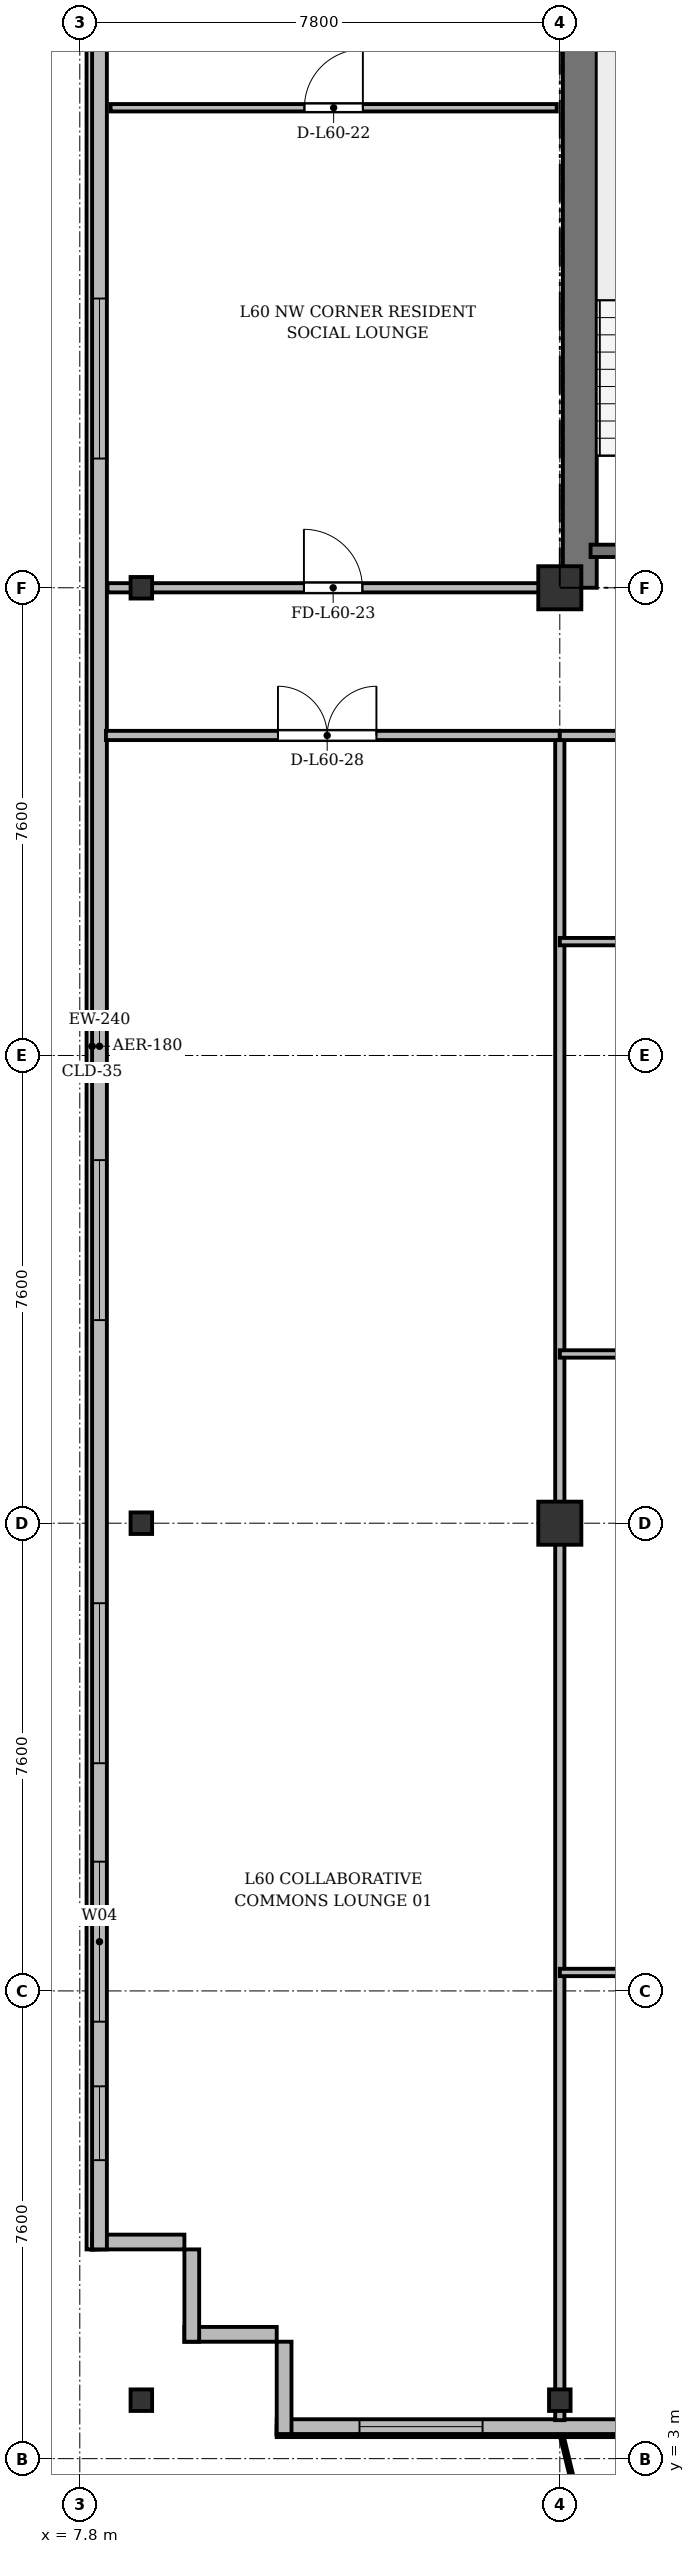
"""IFC4 building model, lengths in metres.
Left out: names, types, materials, properties, quantities, classifications, styles, units other than length and angle.
Written with IfcOpenShell. Run it as: python <this file> out.ifc"""

import sys

from ifc_helpers import new_model, si_unit, direction, frame, frame_2d, origin, origin_2d, place, context, subcontext, project, spatial, rectangle, i_section, extrude, source, transform, mapped, element, fill, save


model = new_model("IFC4")
c1 = context("Model", 3, precision=1e-05, world=origin(), true_north=direction((0.0, 1.0)))
c2 = subcontext(c1, "Body", "Model", "MODEL_VIEW")
j1 = project(units=[si_unit("LENGTHUNIT", "METRE"), si_unit("PLANEANGLEUNIT", "RADIAN")], contexts=[c1])
p1 = place(None, origin())
s1 = spatial("IfcSite", under=j1, at=p1, CompositionType="ELEMENT")
p2 = place(p1, origin())
s2 = spatial("IfcBuilding", under=s1, at=p2, CompositionType="ELEMENT")
p3 = place(p2, frame((0.0, 0.0, 230.1)))
s3 = spatial("IfcBuildingStorey", under=s2, at=p3, CompositionType="ELEMENT", Elevation=230.1)
m1 = source(origin(), c2, "Body", "SweptSolid", [
    extrude(i_section(OverallWidth=0.35, OverallDepth=0.35, WebThickness=0.018, FlangeThickness=0.028, at=origin_2d()), origin(), (0.0, 0.0, 1.0), 3.6),
])
for number, where, z_axis, x_axis in (
    (1, (8.8, 3.95, 0.0), (0.0, 0.0, 1.0), (1.0, 0.0, 0.0)),
    (2, (8.8, 18.2, 0.0), (0.0, 0.0, 1.0), (1.0, 0.0, 0.0)),
    (3, (8.8, 33.4, 0.0), (0.0, 0.0, 1.0), (1.0, 0.0, 0.0)),
    (4, (15.6, 3.95, 0.0), (0.0, 0.0, 1.0), (1.0, 0.0, 0.0)),
):
    element("IfcColumn", number, at=place(p3, frame(where, z_axis=z_axis, x_axis=x_axis)), inside=s3, PredefinedType="COLUMN", context=c2, shape_type="MappedRepresentation", body=[
        mapped(m1, transform((0.0, 0.0, 0.0), x_axis=(1.0, 0.0, 0.0), y_axis=(0.0, 1.0, 0.0), z_axis=(0.0, 0.0, 1.0), scale=1.0)),
    ])
m2 = source(origin(), c2, "Body", "SweptSolid", [
    extrude(rectangle(XDim=0.7, YDim=0.7, at=origin_2d()), origin(), (0.0, 0.0, 1.0), 3.6),
])
for number, where, z_axis, x_axis in (
    (5, (15.6, 18.2, 0.0), (0.0, 0.0, 1.0), (1.0, 0.0, 0.0)),
    (6, (15.6, 33.4, 0.0), (0.0, 0.0, 1.0), (1.0, 0.0, 0.0)),
):
    element("IfcColumn", number, at=place(p3, frame(where, z_axis=z_axis, x_axis=x_axis)), inside=s3, PredefinedType="COLUMN", context=c2, shape_type="MappedRepresentation", body=[
        mapped(m2, transform((0.0, 0.0, 0.0), x_axis=(1.0, 0.0, 0.0), y_axis=(0.0, 1.0, 0.0), z_axis=(0.0, 0.0, 1.0), scale=1.0)),
    ])
for number, where, z_axis, x_axis in (
    (7, (11.0, 5.02, 0.0), (0.0, 0.0, 1.0), (-1.0, 0.0, 0.0)),
    (8, (9.62, 4.9, 0.0), (0.0, 0.0, 1.0), (0.0, 1.0, 0.0)),
):
    element("IfcWall", number, at=place(p3, frame(where, z_axis=z_axis, x_axis=x_axis)), inside=s3, PredefinedType="SOLIDWALL", context=c2, shape_type="SweptSolid", body=[
        extrude(rectangle(XDim=1.5, YDim=0.24, at=frame_2d((0.75, 0.0))), origin(), (0.0, 0.0, 1.0), 3.36),
    ])
p4 = place(p3, frame((9.5, 6.52, 0.0), z_axis=(0.0, 0.0, 1.0), x_axis=(-1.0, 0.0, 0.0)))
e9 = element("IfcWall", 9, at=p4, inside=s3, PredefinedType="SOLIDWALL", context=c2, shape_type="SweptSolid", body=[
    extrude(rectangle(XDim=1.5, YDim=0.24, at=frame_2d((0.75, 0.0))), origin(), (0.0, 0.0, 1.0), 2.86),
])
p5 = place(p3, frame((8.12, 6.4, 0.0), z_axis=(0.0, 0.0, 1.0), x_axis=(0.0, 1.0, 0.0)))
e10 = element("IfcWall", 10, at=p5, inside=s3, PredefinedType="SOLIDWALL", context=c2, shape_type="SweptSolid", body=[
    extrude(rectangle(XDim=39.1, YDim=0.24, at=frame_2d((19.55, 0.0))), origin(), (0.0, 0.0, 1.0), 3.36),
])
p6 = place(p5, frame((1.45, 0.0, 0.92)))
e11 = element("IfcOpeningElement", 11, at=p6, cuts=e10, PredefinedType="OPENING", context=c2, shape_type="SweptSolid", body=[
    extrude(rectangle(XDim=1.2, YDim=1.65, at=frame_2d((0.6, 0.825))), frame((0.0, 0.13, 0.0), z_axis=(0.0, -1.0, 0.0), x_axis=(1.0, 0.0, 0.0)), (0.0, 0.0, 1.0), 0.26),
])
p7 = place(p5, frame((3.7, 0.0, 0.92)))
e12 = element("IfcOpeningElement", 12, at=p7, cuts=e10, PredefinedType="OPENING", context=c2, shape_type="SweptSolid", body=[
    extrude(rectangle(XDim=2.6, YDim=1.9, at=frame_2d((1.3, 0.95))), frame((0.0, 0.13, 0.0), z_axis=(0.0, -1.0, 0.0), x_axis=(1.0, 0.0, 0.0)), (0.0, 0.0, 1.0), 0.26),
])
p8 = place(p5, frame((7.9, 0.0, 0.92)))
e13 = element("IfcOpeningElement", 13, at=p8, cuts=e10, PredefinedType="OPENING", context=c2, shape_type="SweptSolid", body=[
    extrude(rectangle(XDim=2.6, YDim=1.9, at=frame_2d((1.3, 0.95))), frame((0.0, 0.13, 0.0), z_axis=(0.0, -1.0, 0.0), x_axis=(1.0, 0.0, 0.0)), (0.0, 0.0, 1.0), 0.26),
])
p9 = place(p5, frame((15.1, 0.0, 0.92)))
e14 = element("IfcOpeningElement", 14, at=p9, cuts=e10, PredefinedType="OPENING", context=c2, shape_type="SweptSolid", body=[
    extrude(rectangle(XDim=2.6, YDim=1.9, at=frame_2d((1.3, 0.95))), frame((0.0, 0.13, 0.0), z_axis=(0.0, -1.0, 0.0), x_axis=(1.0, 0.0, 0.0)), (0.0, 0.0, 1.0), 0.26),
])
p10 = place(p5, frame((29.1, 0.0, 0.92)))
e15 = element("IfcOpeningElement", 15, at=p10, cuts=e10, PredefinedType="OPENING", context=c2, shape_type="SweptSolid", body=[
    extrude(rectangle(XDim=2.6, YDim=1.9, at=frame_2d((1.3, 0.95))), frame((0.0, 0.13, 0.0), z_axis=(0.0, -1.0, 0.0), x_axis=(1.0, 0.0, 0.0)), (0.0, 0.0, 1.0), 0.26),
])
p11 = place(p5, frame((36.75, 0.0, 0.92)))
e16 = element("IfcOpeningElement", 16, at=p11, cuts=e10, PredefinedType="OPENING", context=c2, shape_type="SweptSolid", body=[
    extrude(rectangle(XDim=1.2, YDim=1.65, at=frame_2d((0.6, 0.825))), frame((0.0, 0.13, 0.0), z_axis=(0.0, -1.0, 0.0), x_axis=(1.0, 0.0, 0.0)), (0.0, 0.0, 1.0), 0.26),
])
p12 = place(p3, frame((44.8, 3.52, 0.0), z_axis=(0.0, 0.0, 1.0), x_axis=(-1.0, 0.0, 0.0)))
e17 = element("IfcWall", 17, at=p12, inside=s3, PredefinedType="SOLIDWALL", context=c2, shape_type="SweptSolid", body=[
    extrude(rectangle(XDim=33.8, YDim=0.24, at=frame_2d((16.9, 0.0))), origin(), (0.0, 0.0, 1.0), 3.36),
])
p13 = place(p12, frame((2.2, 0.0, 0.9)))
e18 = element("IfcOpeningElement", 18, at=p13, cuts=e17, PredefinedType="OPENING", context=c2, shape_type="SweptSolid", body=[
    extrude(rectangle(XDim=2.2, YDim=1.8, at=frame_2d((1.1, 0.9))), frame((0.0, 0.13, 0.0), z_axis=(0.0, -1.0, 0.0), x_axis=(1.0, 0.0, 0.0)), (0.0, 0.0, 1.0), 0.26),
])
p14 = place(p12, frame((6.284, 0.0, 0.9)))
e19 = element("IfcOpeningElement", 19, at=p14, cuts=e17, PredefinedType="OPENING", context=c2, shape_type="SweptSolid", body=[
    extrude(rectangle(XDim=1.5, YDim=1.75, at=frame_2d((0.75, 0.875))), frame((0.0, 0.13, 0.0), z_axis=(0.0, -1.0, 0.0), x_axis=(1.0, 0.0, 0.0)), (0.0, 0.0, 1.0), 0.26),
])
p15 = place(p12, frame((8.9, 0.0, 0.9)))
e20 = element("IfcOpeningElement", 20, at=p15, cuts=e17, PredefinedType="OPENING", context=c2, shape_type="SweptSolid", body=[
    extrude(rectangle(XDim=2.0, YDim=1.95, at=frame_2d((1.0, 0.975))), frame((0.0, 0.13, 0.0), z_axis=(0.0, -1.0, 0.0), x_axis=(1.0, 0.0, 0.0)), (0.0, 0.0, 1.0), 0.26),
])
p16 = place(p12, frame((11.941, 0.0, 0.9)))
e21 = element("IfcOpeningElement", 21, at=p16, cuts=e17, PredefinedType="OPENING", context=c2, shape_type="SweptSolid", body=[
    extrude(rectangle(XDim=1.65, YDim=1.85, at=frame_2d((0.825, 0.925))), frame((0.0, 0.13, 0.0), z_axis=(0.0, -1.0, 0.0), x_axis=(1.0, 0.0, 0.0)), (0.0, 0.0, 1.0), 0.26),
])
p17 = place(p12, frame((17.291, 0.0, 0.0)))
e22 = element("IfcOpeningElement", 22, at=p17, cuts=e17, PredefinedType="OPENING", context=c2, shape_type="SweptSolid", body=[
    extrude(rectangle(XDim=1.2, YDim=2.2, at=frame_2d((0.6, 1.1))), frame((0.0, 0.13, 0.0), z_axis=(0.0, -1.0, 0.0), x_axis=(1.0, 0.0, 0.0)), (0.0, 0.0, 1.0), 0.26),
])
p18 = place(p12, frame((22.25, 0.0, 0.9)))
e23 = element("IfcOpeningElement", 23, at=p18, cuts=e17, PredefinedType="OPENING", context=c2, shape_type="SweptSolid", body=[
    extrude(rectangle(XDim=2.2, YDim=1.8, at=frame_2d((1.1, 0.9))), frame((0.0, 0.13, 0.0), z_axis=(0.0, -1.0, 0.0), x_axis=(1.0, 0.0, 0.0)), (0.0, 0.0, 1.0), 0.26),
])
p19 = place(p12, frame((26.5, 0.0, 0.9)))
e24 = element("IfcOpeningElement", 24, at=p19, cuts=e17, PredefinedType="OPENING", context=c2, shape_type="SweptSolid", body=[
    extrude(rectangle(XDim=1.5, YDim=1.75, at=frame_2d((0.75, 0.875))), frame((0.0, 0.13, 0.0), z_axis=(0.0, -1.0, 0.0), x_axis=(1.0, 0.0, 0.0)), (0.0, 0.0, 1.0), 0.26),
])
p20 = place(p12, frame((30.455, 0.0, 0.9)))
e25 = element("IfcOpeningElement", 25, at=p20, cuts=e17, PredefinedType="OPENING", context=c2, shape_type="SweptSolid", body=[
    extrude(rectangle(XDim=2.0, YDim=1.95, at=frame_2d((1.0, 0.975))), frame((0.0, 0.13, 0.0), z_axis=(0.0, -1.0, 0.0), x_axis=(1.0, 0.0, 0.0)), (0.0, 0.0, 1.0), 0.26),
])
p21 = place(p3, frame((11.12, 3.4, 0.0), z_axis=(0.0, 0.0, 1.0), x_axis=(0.0, 1.0, 0.0)))
e26 = element("IfcWall", 26, at=p21, inside=s3, PredefinedType="SOLIDWALL", context=c2, shape_type="SweptSolid", body=[
    extrude(rectangle(XDim=1.5, YDim=0.24, at=frame_2d((0.75, 0.0))), origin(), (0.0, 0.0, 1.0), 2.91),
])
p22 = place(p3, frame((15.925, 33.4, 0.0), z_axis=(0.0, 0.0, 1.0), x_axis=(0.0, 1.0, 0.0)))
e27 = element("IfcWall", 27, at=p22, inside=s3, PredefinedType="SHEAR", context=c2, shape_type="SweptSolid", body=[
    extrude(rectangle(XDim=11.55, YDim=0.55, at=frame_2d((5.775, 0.0))), origin(), (0.0, 0.0, 1.0), 3.36),
])
p23 = place(p3, frame((16.1, 34.0, 0.0), z_axis=(0.0, 0.0, 1.0), x_axis=(1.0, 0.0, 0.0)))
e28 = element("IfcWall", 28, at=p23, inside=s3, PredefinedType="SHEAR", context=c2, shape_type="SweptSolid", body=[
    extrude(rectangle(XDim=3.4, YDim=0.2, at=frame_2d((1.7, 0.0))), origin(), (0.0, 0.0, 1.0), 3.36),
])
p24 = place(p3, frame((8.3, 41.2, 0.0), z_axis=(0.0, 0.0, 1.0), x_axis=(1.0, 0.0, 0.0)))
e29 = element("IfcWall", 29, at=p24, inside=s3, PredefinedType="PARTITIONING", context=c2, shape_type="SweptSolid", body=[
    extrude(rectangle(XDim=7.25, YDim=0.12, at=frame_2d((3.625, 0.0))), origin(), (0.0, 0.0, 1.0), 2.86),
])
p25 = place(p24, frame((3.15, 0.0, 0.0)))
e30 = element("IfcOpeningElement", 30, at=p25, cuts=e29, PredefinedType="OPENING", context=c2, shape_type="SweptSolid", body=[
    extrude(rectangle(XDim=0.95, YDim=2.15, at=frame_2d((0.475, 1.075))), frame((0.0, 0.07, 0.0), z_axis=(0.0, -1.0, 0.0), x_axis=(1.0, 0.0, 0.0)), (0.0, 0.0, 1.0), 0.14),
])
p26 = place(p3, frame((8.25, 33.4, 0.0), z_axis=(0.0, 0.0, 1.0), x_axis=(1.0, 0.0, 0.0)))
e31 = element("IfcWall", 31, at=p26, inside=s3, PredefinedType="PARTITIONING", context=c2, shape_type="SweptSolid", body=[
    extrude(rectangle(XDim=7.35, YDim=0.15, at=frame_2d((3.675, 0.0))), origin(), (0.0, 0.0, 1.0), 2.91),
])
p27 = place(p26, frame((3.192, 0.0, 0.0)))
e32 = element("IfcOpeningElement", 32, at=p27, cuts=e31, PredefinedType="OPENING", context=c2, shape_type="SweptSolid", body=[
    extrude(rectangle(XDim=0.95, YDim=2.15, at=frame_2d((0.475, 1.075))), frame((0.0, 0.085, 0.0), z_axis=(0.0, -1.0, 0.0), x_axis=(1.0, 0.0, 0.0)), (0.0, 0.0, 1.0), 0.17),
])
p28 = place(p3, frame((15.6, 3.625, 0.0), z_axis=(0.0, 0.0, 1.0), x_axis=(0.0, 1.0, 0.0)))
e33 = element("IfcWall", 33, at=p28, inside=s3, PredefinedType="PARTITIONING", context=c2, shape_type="SweptSolid", body=[
    extrude(rectangle(XDim=27.375, YDim=0.15, at=frame_2d((13.688, 0.0))), origin(), (0.0, 0.0, 1.0), 2.86),
])
p29 = place(p3, frame((8.225, 31.0, 0.0), z_axis=(0.0, 0.0, 1.0), x_axis=(1.0, 0.0, 0.0)))
e34 = element("IfcWall", 34, at=p29, inside=s3, PredefinedType="PARTITIONING", context=c2, shape_type="SweptSolid", body=[
    extrude(rectangle(XDim=7.375, YDim=0.15, at=frame_2d((3.688, 0.0))), origin(), (0.0, 0.0, 1.0), 2.86),
])
p30 = place(p29, frame((2.795, 0.0, 0.0)))
e35 = element("IfcOpeningElement", 35, at=p30, cuts=e34, PredefinedType="OPENING", context=c2, shape_type="SweptSolid", body=[
    extrude(rectangle(XDim=1.6, YDim=2.2, at=frame_2d((0.8, 1.1))), frame((0.0, 0.085, 0.0), z_axis=(0.0, -1.0, 0.0), x_axis=(1.0, 0.0, 0.0)), (0.0, 0.0, 1.0), 0.17),
])
p31 = place(p3, frame((15.6, 20.95, 0.0), z_axis=(0.0, 0.0, 1.0), x_axis=(1.0, 0.0, 0.0)))
e36 = element("IfcWall", 36, at=p31, inside=s3, PredefinedType="PARTITIONING", context=c2, shape_type="SweptSolid", body=[
    extrude(rectangle(XDim=7.8, YDim=0.12, at=frame_2d((3.9, 0.0))), origin(), (0.0, 0.0, 1.0), 2.86),
])
p32 = place(p31, frame((3.333, 0.0, 0.0)))
e37 = element("IfcOpeningElement", 37, at=p32, cuts=e36, PredefinedType="OPENING", context=c2, shape_type="SweptSolid", body=[
    extrude(rectangle(XDim=0.95, YDim=2.15, at=frame_2d((0.475, 1.075))), frame((0.0, 0.07, 0.0), z_axis=(0.0, -1.0, 0.0), x_axis=(1.0, 0.0, 0.0)), (0.0, 0.0, 1.0), 0.14),
])
p33 = place(p3, frame((15.6, 27.65, 0.0), z_axis=(0.0, 0.0, 1.0), x_axis=(1.0, 0.0, 0.0)))
e38 = element("IfcWall", 38, at=p33, inside=s3, PredefinedType="PARTITIONING", context=c2, shape_type="SweptSolid", body=[
    extrude(rectangle(XDim=2.4, YDim=0.12, at=frame_2d((1.2, 0.0))), origin(), (0.0, 0.0, 1.0), 2.86),
])
p34 = place(p3, frame((15.6, 31.0, 0.0), z_axis=(0.0, 0.0, 1.0), x_axis=(1.0, 0.0, 0.0)))
e39 = element("IfcWall", 39, at=p34, inside=s3, PredefinedType="PARTITIONING", context=c2, shape_type="SweptSolid", body=[
    extrude(rectangle(XDim=7.8, YDim=0.15, at=frame_2d((3.9, 0.0))), origin(), (0.0, 0.0, 1.0), 2.86),
])
p35 = place(p34, frame((5.172, 0.0, 0.0)))
e40 = element("IfcOpeningElement", 40, at=p35, cuts=e39, PredefinedType="OPENING", context=c2, shape_type="SweptSolid", body=[
    extrude(rectangle(XDim=0.95, YDim=2.15, at=frame_2d((0.475, 1.075))), frame((0.0, 0.085, 0.0), z_axis=(0.0, -1.0, 0.0), x_axis=(1.0, 0.0, 0.0)), (0.0, 0.0, 1.0), 0.17),
])
p36 = place(p3, frame((15.6, 10.9, 0.0), z_axis=(0.0, 0.0, 1.0), x_axis=(1.0, 0.0, 0.0)))
e41 = element("IfcWall", 41, at=p36, inside=s3, PredefinedType="PARTITIONING", context=c2, shape_type="SweptSolid", body=[
    extrude(rectangle(XDim=3.9, YDim=0.12, at=frame_2d((1.95, 0.0))), origin(), (0.0, 0.0, 1.0), 2.86),
])
p37 = place(p36, frame((1.475, 0.0, 0.0)))
e42 = element("IfcOpeningElement", 42, at=p37, cuts=e41, PredefinedType="OPENING", context=c2, shape_type="SweptSolid", body=[
    extrude(rectangle(XDim=0.95, YDim=2.15, at=frame_2d((0.475, 1.075))), frame((0.0, 0.07, 0.0), z_axis=(0.0, -1.0, 0.0), x_axis=(1.0, 0.0, 0.0)), (0.0, 0.0, 1.0), 0.14),
])
m3 = source(origin(), c2, "Body", "SweptSolid", [
    extrude(rectangle(XDim=1.2, YDim=1.65, at=frame_2d((0.6, 0.825))), frame((0.0, 0.03, 0.0), z_axis=(0.0, -1.0, 0.0), x_axis=(1.0, 0.0, 0.0)), (0.0, 0.0, 1.0), 0.06),
])
p38 = place(p6, origin())
e43 = element("IfcWindow", 43, at=p38, inside=s3, PartitioningType="SINGLE_PANEL", PredefinedType="WINDOW", context=c2, shape_type="MappedRepresentation", body=[
    mapped(m3, transform((0.0, 0.0, 0.0), x_axis=(1.0, 0.0, 0.0), y_axis=(0.0, 1.0, 0.0), z_axis=(0.0, 0.0, 1.0), scale=1.0)),
])
fill(e11, e43)
m4 = source(origin(), c2, "Body", "SweptSolid", [
    extrude(rectangle(XDim=2.6, YDim=1.9, at=frame_2d((1.3, 0.95))), frame((0.0, 0.03, 0.0), z_axis=(0.0, -1.0, 0.0), x_axis=(1.0, 0.0, 0.0)), (0.0, 0.0, 1.0), 0.06),
])
p39 = place(p7, origin())
e44 = element("IfcWindow", 44, at=p39, inside=s3, PartitioningType="SINGLE_PANEL", PredefinedType="WINDOW", context=c2, shape_type="MappedRepresentation", body=[
    mapped(m4, transform((0.0, 0.0, 0.0), x_axis=(1.0, 0.0, 0.0), y_axis=(0.0, 1.0, 0.0), z_axis=(0.0, 0.0, 1.0), scale=1.0)),
])
fill(e12, e44)
p40 = place(p8, origin())
e45 = element("IfcWindow", 45, at=p40, inside=s3, PartitioningType="SINGLE_PANEL", PredefinedType="WINDOW", context=c2, shape_type="MappedRepresentation", body=[
    mapped(m4, transform((0.0, 0.0, 0.0), x_axis=(1.0, 0.0, 0.0), y_axis=(0.0, 1.0, 0.0), z_axis=(0.0, 0.0, 1.0), scale=1.0)),
])
fill(e13, e45)
p41 = place(p9, origin())
e46 = element("IfcWindow", 46, at=p41, inside=s3, PartitioningType="SINGLE_PANEL", PredefinedType="WINDOW", context=c2, shape_type="MappedRepresentation", body=[
    mapped(m4, transform((0.0, 0.0, 0.0), x_axis=(1.0, 0.0, 0.0), y_axis=(0.0, 1.0, 0.0), z_axis=(0.0, 0.0, 1.0), scale=1.0)),
])
fill(e14, e46)
p42 = place(p10, origin())
e47 = element("IfcWindow", 47, at=p42, inside=s3, PartitioningType="SINGLE_PANEL", PredefinedType="WINDOW", context=c2, shape_type="MappedRepresentation", body=[
    mapped(m4, transform((0.0, 0.0, 0.0), x_axis=(1.0, 0.0, 0.0), y_axis=(0.0, 1.0, 0.0), z_axis=(0.0, 0.0, 1.0), scale=1.0)),
])
fill(e15, e47)
m5 = source(origin(), c2, "Body", "SweptSolid", [
    extrude(rectangle(XDim=2.0, YDim=1.95, at=frame_2d((1.0, 0.975))), frame((0.0, 0.03, 0.0), z_axis=(0.0, -1.0, 0.0), x_axis=(1.0, 0.0, 0.0)), (0.0, 0.0, 1.0), 0.06),
])
p43 = place(p20, origin())
e48 = element("IfcWindow", 48, at=p43, inside=s3, PartitioningType="SINGLE_PANEL", PredefinedType="WINDOW", context=c2, shape_type="MappedRepresentation", body=[
    mapped(m5, transform((0.0, 0.0, 0.0), x_axis=(1.0, 0.0, 0.0), y_axis=(0.0, 1.0, 0.0), z_axis=(0.0, 0.0, 1.0), scale=1.0)),
])
fill(e25, e48)
m6 = source(origin(), c2, "Body", "SweptSolid", [
    extrude(rectangle(XDim=0.95, YDim=2.15, at=frame_2d((0.475, 1.075))), frame((0.0, 0.025, 0.0), z_axis=(0.0, -1.0, 0.0), x_axis=(1.0, 0.0, 0.0)), (0.0, 0.0, 1.0), 0.05),
])
p44 = place(p25, origin())
e49 = element("IfcDoor", 49, at=p44, inside=s3, OperationType="SINGLE_SWING_RIGHT", PredefinedType="DOOR", context=c2, shape_type="MappedRepresentation", body=[
    mapped(m6, transform((0.0, 0.0, 0.0), x_axis=(1.0, 0.0, 0.0), y_axis=(0.0, 1.0, 0.0), z_axis=(0.0, 0.0, 1.0), scale=1.0)),
])
fill(e30, e49)
p45 = place(p27, origin())
e50 = element("IfcDoor", 50, at=p45, inside=s3, OperationType="SINGLE_SWING_LEFT", PredefinedType="DOOR", context=c2, shape_type="MappedRepresentation", body=[
    mapped(m6, transform((0.0, 0.0, 0.0), x_axis=(1.0, 0.0, 0.0), y_axis=(0.0, 1.0, 0.0), z_axis=(0.0, 0.0, 1.0), scale=1.0)),
])
fill(e32, e50)
m7 = source(origin(), c2, "Body", "SweptSolid", [
    extrude(rectangle(XDim=1.6, YDim=2.2, at=frame_2d((0.8, 1.1))), frame((0.0, 0.025, 0.0), z_axis=(0.0, -1.0, 0.0), x_axis=(1.0, 0.0, 0.0)), (0.0, 0.0, 1.0), 0.05),
])
p46 = place(p30, origin())
e51 = element("IfcDoor", 51, at=p46, inside=s3, OperationType="DOUBLE_DOOR_SINGLE_SWING", PredefinedType="DOOR", context=c2, shape_type="MappedRepresentation", body=[
    mapped(m7, transform((0.0, 0.0, 0.0), x_axis=(1.0, 0.0, 0.0), y_axis=(0.0, 1.0, 0.0), z_axis=(0.0, 0.0, 1.0), scale=1.0)),
])
fill(e35, e51)
save(model, sys.argv[1])
